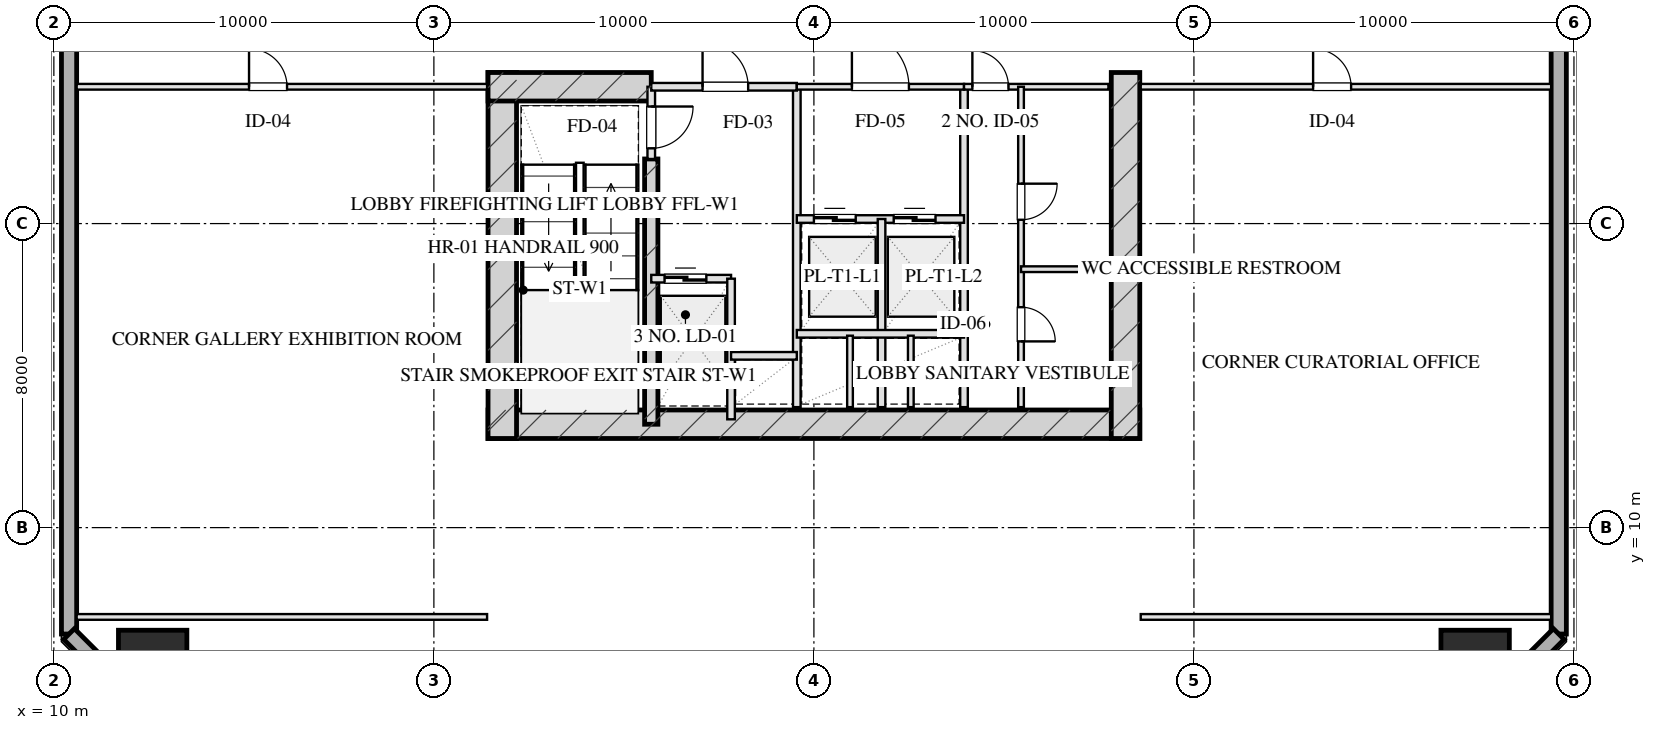
"""IFC4 building model, lengths in metres.
Left out: names, types, materials, properties, quantities, classifications, styles, units other than length and angle.
Written with IfcOpenShell. Run it as: python <this file> out.ifc"""

import sys

from ifc_helpers import new_model, si_unit, direction, frame, frame_2d, origin, origin_2d, place, context, subcontext, project, spatial, rectangle, hollow_rectangle, extrude, element, fill, save


model = new_model("IFC4")
c1 = context("Model", 3, precision=1e-05, world=origin(), true_north=direction((0.0, 1.0)))
c2 = subcontext(c1, "Body", "Model", "MODEL_VIEW")
j1 = project(units=[si_unit("LENGTHUNIT", "METRE"), si_unit("PLANEANGLEUNIT", "RADIAN")], contexts=[c1])
p1 = place(None, origin())
s1 = spatial("IfcSite", under=j1, at=p1, CompositionType="ELEMENT")
p2 = place(p1, origin())
s2 = spatial("IfcBuilding", under=s1, at=p2, CompositionType="ELEMENT")
p3 = place(p2, frame((0.0, 0.0, 30.0)))
s3 = spatial("IfcBuildingStorey", under=s2, at=p3, CompositionType="ELEMENT", Elevation=30.0)
p4 = place(p3, frame((21.425, 12.72, 0.0), z_axis=(0.0, 0.0, 1.0), x_axis=(1.0, 0.0, 0.0)))
e1 = element("IfcWall", 1, at=p4, inside=s3, PredefinedType="SHEAR", context=c2, shape_type="SweptSolid", body=[
    extrude(rectangle(XDim=17.15, YDim=0.75, at=frame_2d((8.575, 0.0))), origin(), (0.0, 0.0, 1.0), 4.0),
])
for number, where, z_axis, x_axis in (
    (2, (21.8, 21.975, 0.0), (0.0, 0.0, 1.0), (0.0, -1.0, 0.0)),
    (3, (38.2, 21.975, 0.0), (0.0, 0.0, 1.0), (0.0, -1.0, 0.0)),
):
    element("IfcWall", number, at=place(p3, frame(where, z_axis=z_axis, x_axis=x_axis)), inside=s3, PredefinedType="SHEAR", context=c2, shape_type="SweptSolid", body=[
        extrude(rectangle(XDim=9.63, YDim=0.75, at=frame_2d((4.815, 0.0))), origin(), (0.0, 0.0, 1.0), 4.0),
    ])
p5 = place(p3, frame((25.72, 19.7, 0.0), z_axis=(0.0, 0.0, 1.0), x_axis=(0.0, -1.0, 0.0)))
e4 = element("IfcWall", 4, at=p5, inside=s3, PredefinedType="SHEAR", context=c2, shape_type="SweptSolid", body=[
    extrude(rectangle(XDim=6.98, YDim=0.35, at=frame_2d((3.49, 0.0))), origin(), (0.0, 0.0, 1.0), 4.0),
])
p6 = place(p3, frame((21.425, 21.6, 0.0), z_axis=(0.0, 0.0, 1.0), x_axis=(1.0, 0.0, 0.0)))
e5 = element("IfcWall", 5, at=p6, inside=s3, PredefinedType="SHEAR", context=c2, shape_type="SweptSolid", body=[
    extrude(rectangle(XDim=4.295, YDim=0.75, at=frame_2d((2.147, 0.0))), origin(), (0.0, 0.0, 1.0), 4.0),
])
for number, where, z_axis, x_axis in (
    (6, (12.6, 6.4, 0.0), (0.0, 0.0, 1.0), (1.0, 0.0, 0.0)),
    (7, (47.4, 6.4, 0.0), (0.0, 0.0, 1.0), (1.0, 0.0, 0.0)),
):
    element("IfcColumn", number, at=place(p3, frame(where, z_axis=z_axis, x_axis=x_axis)), inside=s3, PredefinedType="COLUMN", context=c2, shape_type="SweptSolid", body=[
        extrude(hollow_rectangle(XDim=1.8, YDim=1.8, WallThickness=0.06, at=origin_2d()), origin(), (0.0, 0.0, 1.0), 4.001),
    ])
p7 = place(p3, frame((10.4, 7.2, 0.0), z_axis=(0.0, 0.0, 1.0), x_axis=(0.0, 1.0, 0.0)))
e8 = element("IfcWall", 8, at=p7, inside=s3, PredefinedType="SOLIDWALL", context=c2, shape_type="SweptSolid", body=[
    extrude(rectangle(XDim=53.6, YDim=0.4, at=frame_2d((26.8, 0.0))), origin(), (0.0, 0.0, 1.0), 3.16),
])
p8 = place(p7, frame((22.95, 0.0, 0.75)))
e9 = element("IfcOpeningElement", 9, at=p8, cuts=e8, PredefinedType="OPENING", context=c2, shape_type="SweptSolid", body=[
    extrude(rectangle(XDim=2.5, YDim=1.75, at=frame_2d((1.25, 0.875))), frame((0.0, 0.21, 0.0), z_axis=(0.0, -1.0, 0.0), x_axis=(1.0, 0.0, 0.0)), (0.0, 0.0, 1.0), 0.42),
])
p9 = place(p7, frame((28.15, 0.0, 0.75)))
e10 = element("IfcOpeningElement", 10, at=p9, cuts=e8, PredefinedType="OPENING", context=c2, shape_type="SweptSolid", body=[
    extrude(rectangle(XDim=2.5, YDim=1.75, at=frame_2d((1.25, 0.875))), frame((0.0, 0.21, 0.0), z_axis=(0.0, -1.0, 0.0), x_axis=(1.0, 0.0, 0.0)), (0.0, 0.0, 1.0), 0.42),
])
p10 = place(p3, frame((49.6, 60.8, 0.0), z_axis=(0.0, 0.0, 1.0), x_axis=(0.0, -1.0, 0.0)))
e11 = element("IfcWall", 11, at=p10, inside=s3, PredefinedType="SOLIDWALL", context=c2, shape_type="SweptSolid", body=[
    extrude(rectangle(XDim=53.6, YDim=0.4, at=frame_2d((26.8, 0.0))), origin(), (0.0, 0.0, 1.0), 3.16),
])
p11 = place(p10, frame((28.15, 0.0, 0.75)))
e12 = element("IfcOpeningElement", 12, at=p11, cuts=e11, PredefinedType="OPENING", context=c2, shape_type="SweptSolid", body=[
    extrude(rectangle(XDim=2.5, YDim=1.75, at=frame_2d((1.25, 0.875))), frame((0.0, 0.21, 0.0), z_axis=(0.0, -1.0, 0.0), x_axis=(1.0, 0.0, 0.0)), (0.0, 0.0, 1.0), 0.42),
])
p12 = place(p10, frame((22.95, 0.0, 0.75)))
e13 = element("IfcOpeningElement", 13, at=p12, cuts=e11, PredefinedType="OPENING", context=c2, shape_type="SweptSolid", body=[
    extrude(rectangle(XDim=2.5, YDim=1.75, at=frame_2d((1.25, 0.875))), frame((0.0, 0.21, 0.0), z_axis=(0.0, -1.0, 0.0), x_axis=(1.0, 0.0, 0.0)), (0.0, 0.0, 1.0), 0.42),
])
for number, where, z_axis, x_axis in (
    (14, (49.6, 7.2, 0.0), (0.0, 0.0, 1.0), (-0.707, -0.707, 0.0)),
    (15, (13.4, 4.2, 0.0), (0.0, 0.0, 1.0), (-0.707, 0.707, 0.0)),
):
    element("IfcWall", number, at=place(p3, frame(where, z_axis=z_axis, x_axis=x_axis)), inside=s3, PredefinedType="SOLIDWALL", context=c2, shape_type="SweptSolid", body=[
        extrude(rectangle(XDim=4.243, YDim=0.4, at=frame_2d((2.121, 0.0))), origin(), (0.0, 0.0, 1.0), 3.16),
    ])
p13 = place(p3, frame((25.72, 21.6, 0.0), z_axis=(0.0, 0.0, 1.0), x_axis=(0.0, -1.0, 0.0)))
e16 = element("IfcWall", 16, at=p13, inside=s3, PredefinedType="PARTITIONING", context=c2, shape_type="SweptSolid", body=[
    extrude(rectangle(XDim=1.9, YDim=0.2, at=frame_2d((0.95, 0.0))), origin(), (0.0, 0.0, 1.0), 3.725),
])
p14 = place(p13, frame((0.52, 0.0, 0.0)))
e17 = element("IfcOpeningElement", 17, at=p14, cuts=e16, PredefinedType="OPENING", context=c2, shape_type="SweptSolid", body=[
    extrude(rectangle(XDim=1.1, YDim=2.05, at=frame_2d((0.55, 1.025))), frame((0.0, 0.11, 0.0), z_axis=(0.0, -1.0, 0.0), x_axis=(1.0, 0.0, 0.0)), (0.0, 0.0, 1.0), 0.22),
])
p15 = place(p3, frame((29.55, 21.6, 0.0), z_axis=(0.0, 0.0, 1.0), x_axis=(0.0, -1.0, 0.0)))
e18 = element("IfcWall", 18, at=p15, inside=s3, PredefinedType="PARTITIONING", context=c2, shape_type="SweptSolid", body=[
    extrude(rectangle(XDim=8.43, YDim=0.2, at=frame_2d((4.215, 0.0))), origin(), (0.0, 0.0, 1.0), 3.725),
])
p16 = place(p3, frame((25.72, 21.6, 0.0), z_axis=(0.0, 0.0, 1.0), x_axis=(1.0, 0.0, 0.0)))
e19 = element("IfcWall", 19, at=p16, inside=s3, PredefinedType="PARTITIONING", context=c2, shape_type="SweptSolid", body=[
    extrude(rectangle(XDim=3.83, YDim=0.2, at=frame_2d((1.915, 0.0))), origin(), (0.0, 0.0, 1.0), 3.725),
])
p17 = place(p16, frame((1.35, 0.0, 0.0)))
e20 = element("IfcOpeningElement", 20, at=p17, cuts=e19, PredefinedType="OPENING", context=c2, shape_type="SweptSolid", body=[
    extrude(rectangle(XDim=1.2, YDim=2.05, at=frame_2d((0.6, 1.025))), frame((0.0, 0.11, 0.0), z_axis=(0.0, -1.0, 0.0), x_axis=(1.0, 0.0, 0.0)), (0.0, 0.0, 1.0), 0.22),
])
p18 = place(p3, frame((25.72, 16.55, 0.0), z_axis=(0.0, 0.0, 1.0), x_axis=(1.0, 0.0, 0.0)))
e21 = element("IfcWall", 21, at=p18, inside=s3, PredefinedType="PARTITIONING", context=c2, shape_type="SweptSolid", body=[
    extrude(rectangle(XDim=2.1, YDim=0.2, at=frame_2d((1.05, 0.0))), origin(), (0.0, 0.0, 1.0), 3.725),
])
p19 = place(p18, frame((0.35, 0.0, 0.0)))
e22 = element("IfcOpeningElement", 22, at=p19, cuts=e21, PredefinedType="OPENING", context=c2, shape_type="SweptSolid", body=[
    extrude(rectangle(XDim=1.1, YDim=2.05, at=frame_2d((0.55, 1.025))), frame((0.0, 0.11, 0.0), z_axis=(0.0, -1.0, 0.0), x_axis=(1.0, 0.0, 0.0)), (0.0, 0.0, 1.0), 0.22),
])
p20 = place(p3, frame((27.82, 16.55, 0.0), z_axis=(0.0, 0.0, 1.0), x_axis=(0.0, -1.0, 0.0)))
e23 = element("IfcWall", 23, at=p20, inside=s3, PredefinedType="PARTITIONING", context=c2, shape_type="SweptSolid", body=[
    extrude(rectangle(XDim=3.7, YDim=0.2, at=frame_2d((1.85, 0.0))), origin(), (0.0, 0.0, 1.0), 3.725),
])
p21 = place(p3, frame((27.82, 14.52, 0.0), z_axis=(0.0, 0.0, 1.0), x_axis=(1.0, 0.0, 0.0)))
e24 = element("IfcWall", 24, at=p21, inside=s3, PredefinedType="PARTITIONING", context=c2, shape_type="SweptSolid", body=[
    extrude(rectangle(XDim=1.73, YDim=0.2, at=frame_2d((0.865, 0.0))), origin(), (0.0, 0.0, 1.0), 3.725),
])
p22 = place(p3, frame((33.95, 21.6, 0.0), z_axis=(0.0, 0.0, 1.0), x_axis=(0.0, -1.0, 0.0)))
e25 = element("IfcWall", 25, at=p22, inside=s3, PredefinedType="PARTITIONING", context=c2, shape_type="SweptSolid", body=[
    extrude(rectangle(XDim=8.43, YDim=0.2, at=frame_2d((4.215, 0.0))), origin(), (0.0, 0.0, 1.0), 3.725),
])
p23 = place(p3, frame((29.55, 21.6, 0.0), z_axis=(0.0, 0.0, 1.0), x_axis=(1.0, 0.0, 0.0)))
e26 = element("IfcWall", 26, at=p23, inside=s3, PredefinedType="PARTITIONING", context=c2, shape_type="SweptSolid", body=[
    extrude(rectangle(XDim=4.4, YDim=0.15, at=frame_2d((2.2, 0.0))), origin(), (0.0, 0.0, 1.0), 3.725),
])
p24 = place(p23, frame((1.45, 0.0, 0.0)))
e27 = element("IfcOpeningElement", 27, at=p24, cuts=e26, PredefinedType="OPENING", context=c2, shape_type="SweptSolid", body=[
    extrude(rectangle(XDim=1.5, YDim=2.05, at=frame_2d((0.75, 1.025))), frame((0.0, 0.085, 0.0), z_axis=(0.0, -1.0, 0.0), x_axis=(1.0, 0.0, 0.0)), (0.0, 0.0, 1.0), 0.17),
])
p25 = place(p3, frame((29.55, 18.12, 0.0), z_axis=(0.0, 0.0, 1.0), x_axis=(1.0, 0.0, 0.0)))
e28 = element("IfcWall", 28, at=p25, inside=s3, PredefinedType="PARTITIONING", context=c2, shape_type="SweptSolid", body=[
    extrude(rectangle(XDim=4.4, YDim=0.2, at=frame_2d((2.2, 0.0))), origin(), (0.0, 0.0, 1.0), 3.725),
])
p26 = place(p25, frame((0.45, 0.0, 0.0)))
e29 = element("IfcOpeningElement", 29, at=p26, cuts=e28, PredefinedType="OPENING", context=c2, shape_type="SweptSolid", body=[
    extrude(rectangle(XDim=1.1, YDim=2.05, at=frame_2d((0.55, 1.025))), frame((0.0, 0.11, 0.0), z_axis=(0.0, -1.0, 0.0), x_axis=(1.0, 0.0, 0.0)), (0.0, 0.0, 1.0), 0.22),
])
p27 = place(p25, frame((2.55, 0.0, 0.0)))
e30 = element("IfcOpeningElement", 30, at=p27, cuts=e28, PredefinedType="OPENING", context=c2, shape_type="SweptSolid", body=[
    extrude(rectangle(XDim=1.1, YDim=2.05, at=frame_2d((0.55, 1.025))), frame((0.0, 0.11, 0.0), z_axis=(0.0, -1.0, 0.0), x_axis=(1.0, 0.0, 0.0)), (0.0, 0.0, 1.0), 0.22),
])
p28 = place(p3, frame((31.78, 18.12, 0.0), z_axis=(0.0, 0.0, 1.0), x_axis=(0.0, -1.0, 0.0)))
e31 = element("IfcWall", 31, at=p28, inside=s3, PredefinedType="PARTITIONING", context=c2, shape_type="SweptSolid", body=[
    extrude(rectangle(XDim=4.95, YDim=0.2, at=frame_2d((2.475, 0.0))), origin(), (0.0, 0.0, 1.0), 3.725),
])
p29 = place(p3, frame((29.55, 15.1, 0.0), z_axis=(0.0, 0.0, 1.0), x_axis=(1.0, 0.0, 0.0)))
e32 = element("IfcWall", 32, at=p29, inside=s3, PredefinedType="PARTITIONING", context=c2, shape_type="SweptSolid", body=[
    extrude(rectangle(XDim=4.4, YDim=0.2, at=frame_2d((2.2, 0.0))), origin(), (0.0, 0.0, 1.0), 3.725),
])
for number, where, z_axis, x_axis in (
    (33, (30.95, 15.05, 0.0), (0.0, 0.0, 1.0), (0.0, -1.0, 0.0)),
    (34, (32.55, 15.05, 0.0), (0.0, 0.0, 1.0), (0.0, -1.0, 0.0)),
):
    element("IfcWall", number, at=place(p3, frame(where, z_axis=z_axis, x_axis=x_axis)), inside=s3, PredefinedType="PARTITIONING", context=c2, shape_type="SweptSolid", body=[
        extrude(rectangle(XDim=1.88, YDim=0.15, at=frame_2d((0.94, 0.0))), origin(), (0.0, 0.0, 1.0), 3.725),
    ])
p30 = place(p3, frame((33.95, 21.6, 0.0), z_axis=(0.0, 0.0, 1.0), x_axis=(1.0, 0.0, 0.0)))
e35 = element("IfcWall", 35, at=p30, inside=s3, PredefinedType="PARTITIONING", context=c2, shape_type="SweptSolid", body=[
    extrude(rectangle(XDim=3.8, YDim=0.15, at=frame_2d((1.9, 0.0))), origin(), (0.0, 0.0, 1.0), 3.725),
])
p31 = place(p30, frame((0.22, 0.0, 0.0)))
e36 = element("IfcOpeningElement", 36, at=p31, cuts=e35, PredefinedType="OPENING", context=c2, shape_type="SweptSolid", body=[
    extrude(rectangle(XDim=0.95, YDim=2.05, at=frame_2d((0.475, 1.025))), frame((0.0, 0.085, 0.0), z_axis=(0.0, -1.0, 0.0), x_axis=(1.0, 0.0, 0.0)), (0.0, 0.0, 1.0), 0.17),
])
p32 = place(p3, frame((35.45, 21.6, 0.0), z_axis=(0.0, 0.0, 1.0), x_axis=(0.0, -1.0, 0.0)))
e37 = element("IfcWall", 37, at=p32, inside=s3, PredefinedType="PARTITIONING", context=c2, shape_type="SweptSolid", body=[
    extrude(rectangle(XDim=8.43, YDim=0.15, at=frame_2d((4.215, 0.0))), origin(), (0.0, 0.0, 1.0), 3.315),
])
p33 = place(p32, frame((2.55, 0.0, 0.0)))
e38 = element("IfcOpeningElement", 38, at=p33, cuts=e37, PredefinedType="OPENING", context=c2, shape_type="SweptSolid", body=[
    extrude(rectangle(XDim=0.95, YDim=2.05, at=frame_2d((0.475, 1.025))), frame((0.0, 0.085, 0.0), z_axis=(0.0, -1.0, 0.0), x_axis=(1.0, 0.0, 0.0)), (0.0, 0.0, 1.0), 0.17),
])
p34 = place(p32, frame((5.8, 0.0, 0.0)))
e39 = element("IfcOpeningElement", 39, at=p34, cuts=e37, PredefinedType="OPENING", context=c2, shape_type="SweptSolid", body=[
    extrude(rectangle(XDim=0.9, YDim=2.05, at=frame_2d((0.45, 1.025))), frame((0.0, 0.085, 0.0), z_axis=(0.0, -1.0, 0.0), x_axis=(1.0, 0.0, 0.0)), (0.0, 0.0, 1.0), 0.17),
])
p35 = place(p3, frame((35.45, 16.8, 0.0), z_axis=(0.0, 0.0, 1.0), x_axis=(1.0, 0.0, 0.0)))
e40 = element("IfcWall", 40, at=p35, inside=s3, PredefinedType="PARTITIONING", context=c2, shape_type="SweptSolid", body=[
    extrude(rectangle(XDim=2.3, YDim=0.15, at=frame_2d((1.15, 0.0))), origin(), (0.0, 0.0, 1.0), 3.725),
])
p36 = place(p3, frame((10.6, 7.65, 0.0), z_axis=(0.0, 0.0, 1.0), x_axis=(1.0, 0.0, 0.0)))
e41 = element("IfcWall", 41, at=p36, inside=s3, PredefinedType="PARTITIONING", context=c2, shape_type="SweptSolid", body=[
    extrude(rectangle(XDim=10.8, YDim=0.15, at=frame_2d((5.4, 0.0))), origin(), (0.0, 0.0, 1.0), 3.725),
])
p37 = place(p3, frame((10.6, 21.6, 0.0), z_axis=(0.0, 0.0, 1.0), x_axis=(1.0, 0.0, 0.0)))
e42 = element("IfcWall", 42, at=p37, inside=s3, PredefinedType="PARTITIONING", context=c2, shape_type="SweptSolid", body=[
    extrude(rectangle(XDim=10.8, YDim=0.15, at=frame_2d((5.4, 0.0))), origin(), (0.0, 0.0, 1.0), 3.725),
])
p38 = place(p37, frame((4.536, 0.0, 0.0)))
e43 = element("IfcOpeningElement", 43, at=p38, cuts=e42, PredefinedType="OPENING", context=c2, shape_type="SweptSolid", body=[
    extrude(rectangle(XDim=1.0, YDim=2.05, at=frame_2d((0.5, 1.025))), frame((0.0, 0.085, 0.0), z_axis=(0.0, -1.0, 0.0), x_axis=(1.0, 0.0, 0.0)), (0.0, 0.0, 1.0), 0.17),
])
p39 = place(p3, frame((38.6, 7.65, 0.0), z_axis=(0.0, 0.0, 1.0), x_axis=(1.0, 0.0, 0.0)))
e44 = element("IfcWall", 44, at=p39, inside=s3, PredefinedType="PARTITIONING", context=c2, shape_type="SweptSolid", body=[
    extrude(rectangle(XDim=10.8, YDim=0.15, at=frame_2d((5.4, 0.0))), origin(), (0.0, 0.0, 1.0), 3.725),
])
p40 = place(p3, frame((38.6, 21.6, 0.0), z_axis=(0.0, 0.0, 1.0), x_axis=(1.0, 0.0, 0.0)))
e45 = element("IfcWall", 45, at=p40, inside=s3, PredefinedType="PARTITIONING", context=c2, shape_type="SweptSolid", body=[
    extrude(rectangle(XDim=10.8, YDim=0.15, at=frame_2d((5.4, 0.0))), origin(), (0.0, 0.0, 1.0), 3.725),
])
p41 = place(p40, frame((4.536, 0.0, 0.0)))
e46 = element("IfcOpeningElement", 46, at=p41, cuts=e45, PredefinedType="OPENING", context=c2, shape_type="SweptSolid", body=[
    extrude(rectangle(XDim=1.0, YDim=2.05, at=frame_2d((0.5, 1.025))), frame((0.0, 0.085, 0.0), z_axis=(0.0, -1.0, 0.0), x_axis=(1.0, 0.0, 0.0)), (0.0, 0.0, 1.0), 0.17),
])
p42 = place(p14, origin())
e47 = element("IfcDoor", 47, at=p42, inside=s3, OperationType="SINGLE_SWING_LEFT", PredefinedType="DOOR", context=c2, shape_type="SweptSolid", body=[
    extrude(rectangle(XDim=1.1, YDim=2.05, at=frame_2d((0.55, 1.025))), frame((0.0, 0.025, 0.0), z_axis=(0.0, -1.0, 0.0), x_axis=(1.0, 0.0, 0.0)), (0.0, 0.0, 1.0), 0.05),
])
fill(e17, e47)
p43 = place(p17, origin())
e48 = element("IfcDoor", 48, at=p43, inside=s3, OperationType="SINGLE_SWING_LEFT", PredefinedType="DOOR", context=c2, shape_type="SweptSolid", body=[
    extrude(rectangle(XDim=1.2, YDim=2.05, at=frame_2d((0.6, 1.025))), frame((0.0, 0.025, 0.0), z_axis=(0.0, -1.0, 0.0), x_axis=(1.0, 0.0, 0.0)), (0.0, 0.0, 1.0), 0.05),
])
fill(e20, e48)
p44 = place(p19, origin())
e49 = element("IfcDoor", 49, at=p44, inside=s3, OperationType="DOUBLE_DOOR_SLIDING", PredefinedType="DOOR", context=c2, shape_type="SweptSolid", body=[
    extrude(rectangle(XDim=1.1, YDim=2.05, at=frame_2d((0.55, 1.025))), frame((0.0, 0.025, 0.0), z_axis=(0.0, -1.0, 0.0), x_axis=(1.0, 0.0, 0.0)), (0.0, 0.0, 1.0), 0.05),
])
fill(e22, e49)
p45 = place(p24, origin())
e50 = element("IfcDoor", 50, at=p45, inside=s3, OperationType="SINGLE_SWING_LEFT", PredefinedType="DOOR", context=c2, shape_type="SweptSolid", body=[
    extrude(rectangle(XDim=1.5, YDim=2.05, at=frame_2d((0.75, 1.025))), frame((0.0, 0.025, 0.0), z_axis=(0.0, -1.0, 0.0), x_axis=(1.0, 0.0, 0.0)), (0.0, 0.0, 1.0), 0.05),
])
fill(e27, e50)
p46 = place(p26, origin())
e51 = element("IfcDoor", 51, at=p46, inside=s3, OperationType="DOUBLE_DOOR_SLIDING", PredefinedType="DOOR", context=c2, shape_type="SweptSolid", body=[
    extrude(rectangle(XDim=1.1, YDim=2.05, at=frame_2d((0.55, 1.025))), frame((0.0, 0.025, 0.0), z_axis=(0.0, -1.0, 0.0), x_axis=(1.0, 0.0, 0.0)), (0.0, 0.0, 1.0), 0.05),
])
fill(e29, e51)
p47 = place(p27, origin())
e52 = element("IfcDoor", 52, at=p47, inside=s3, OperationType="DOUBLE_DOOR_SLIDING", PredefinedType="DOOR", context=c2, shape_type="SweptSolid", body=[
    extrude(rectangle(XDim=1.1, YDim=2.05, at=frame_2d((0.55, 1.025))), frame((0.0, 0.025, 0.0), z_axis=(0.0, -1.0, 0.0), x_axis=(1.0, 0.0, 0.0)), (0.0, 0.0, 1.0), 0.05),
])
fill(e30, e52)
p48 = place(p31, origin())
e53 = element("IfcDoor", 53, at=p48, inside=s3, OperationType="SINGLE_SWING_LEFT", PredefinedType="DOOR", context=c2, shape_type="SweptSolid", body=[
    extrude(rectangle(XDim=0.95, YDim=2.05, at=frame_2d((0.475, 1.025))), frame((0.0, 0.025, 0.0), z_axis=(0.0, -1.0, 0.0), x_axis=(1.0, 0.0, 0.0)), (0.0, 0.0, 1.0), 0.05),
])
fill(e36, e53)
p49 = place(p33, origin())
e54 = element("IfcDoor", 54, at=p49, inside=s3, OperationType="SINGLE_SWING_LEFT", PredefinedType="DOOR", context=c2, shape_type="SweptSolid", body=[
    extrude(rectangle(XDim=0.95, YDim=2.05, at=frame_2d((0.475, 1.025))), frame((0.0, 0.025, 0.0), z_axis=(0.0, -1.0, 0.0), x_axis=(1.0, 0.0, 0.0)), (0.0, 0.0, 1.0), 0.05),
])
fill(e38, e54)
p50 = place(p34, origin())
e55 = element("IfcDoor", 55, at=p50, inside=s3, OperationType="SINGLE_SWING_RIGHT", PredefinedType="DOOR", context=c2, shape_type="SweptSolid", body=[
    extrude(rectangle(XDim=0.9, YDim=2.05, at=frame_2d((0.45, 1.025))), frame((0.0, 0.025, 0.0), z_axis=(0.0, -1.0, 0.0), x_axis=(1.0, 0.0, 0.0)), (0.0, 0.0, 1.0), 0.05),
])
fill(e39, e55)
p51 = place(p38, origin())
e56 = element("IfcDoor", 56, at=p51, inside=s3, OperationType="SINGLE_SWING_LEFT", PredefinedType="DOOR", context=c2, shape_type="SweptSolid", body=[
    extrude(rectangle(XDim=1.0, YDim=2.05, at=frame_2d((0.5, 1.025))), frame((0.0, 0.025, 0.0), z_axis=(0.0, -1.0, 0.0), x_axis=(1.0, 0.0, 0.0)), (0.0, 0.0, 1.0), 0.05),
])
fill(e43, e56)
p52 = place(p41, origin())
e57 = element("IfcDoor", 57, at=p52, inside=s3, OperationType="SINGLE_SWING_LEFT", PredefinedType="DOOR", context=c2, shape_type="SweptSolid", body=[
    extrude(rectangle(XDim=1.0, YDim=2.05, at=frame_2d((0.5, 1.025))), frame((0.0, 0.025, 0.0), z_axis=(0.0, -1.0, 0.0), x_axis=(1.0, 0.0, 0.0)), (0.0, 0.0, 1.0), 0.05),
])
fill(e46, e57)
save(model, sys.argv[1])
